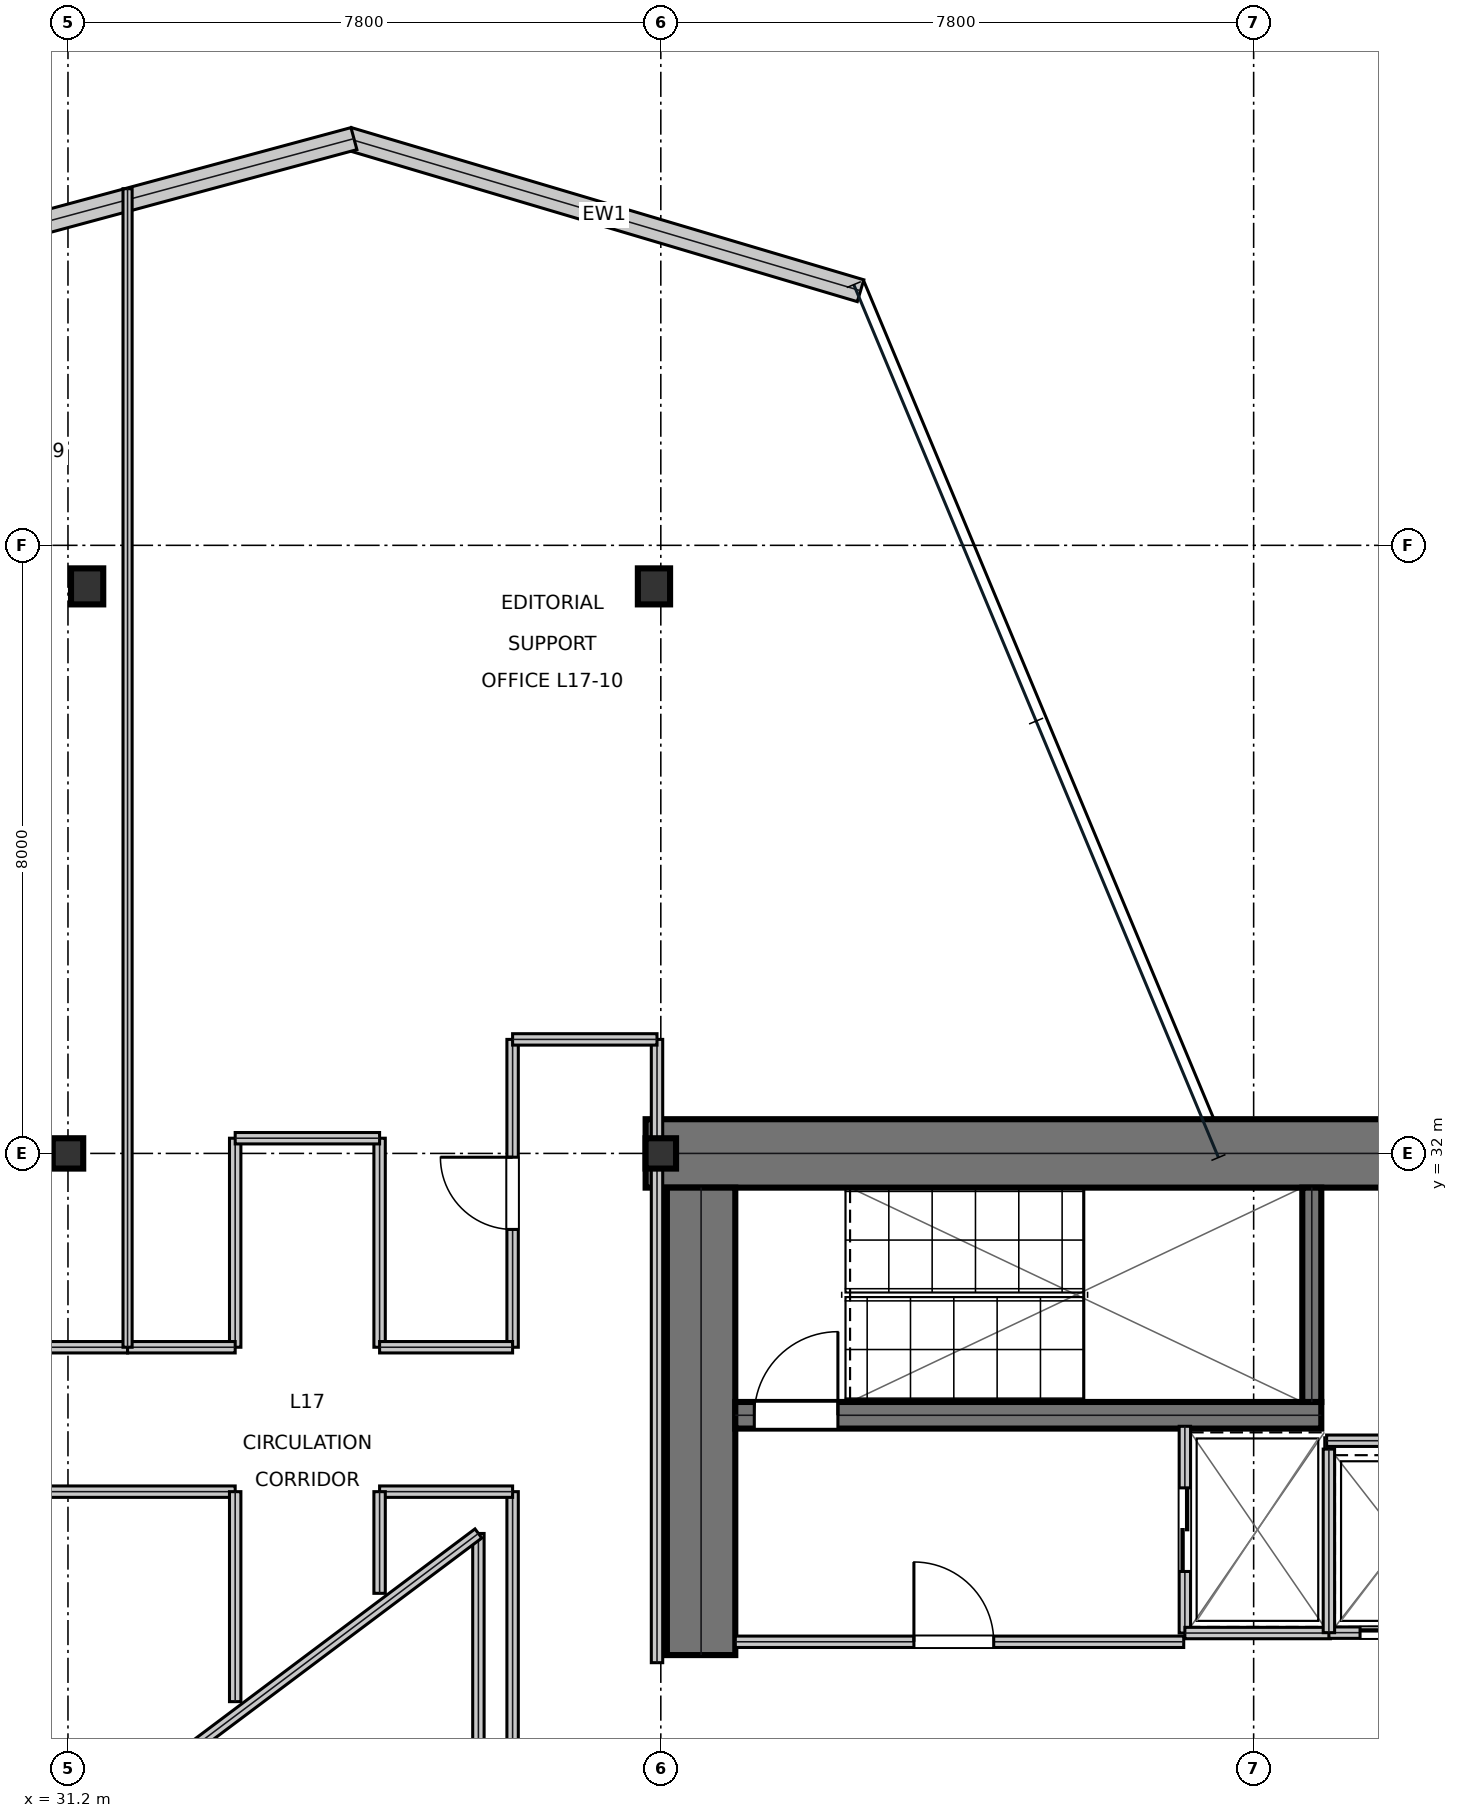
"""IFC4 building model, lengths in metres.
Left out: names, types, materials, properties, quantities, classifications, styles, units other than length and angle.
Written with IfcOpenShell. Run it as: python <this file> out.ifc"""

import sys

from ifc_helpers import new_model, si_unit, direction, frame, frame_2d, origin, origin_2d, place, context, subcontext, project, spatial, rectangle, i_section, extrude, element, fill, save


model = new_model("IFC4")
c1 = context("Model", 3, precision=1e-05, world=origin(), true_north=direction((0.0, 1.0)))
c2 = subcontext(c1, "Body", "Model", "MODEL_VIEW")
j1 = project(units=[si_unit("LENGTHUNIT", "METRE"), si_unit("PLANEANGLEUNIT", "RADIAN")], contexts=[c1])
p1 = place(None, origin())
s1 = spatial("IfcSite", under=j1, at=p1, CompositionType="ELEMENT")
p2 = place(p1, origin())
s2 = spatial("IfcBuilding", under=s1, at=p2, CompositionType="ELEMENT")
p3 = place(p2, frame((0.0, 0.0, 78.3)))
s3 = spatial("IfcBuildingStorey", under=s2, at=p3, CompositionType="ELEMENT", Elevation=78.3)
p4 = place(p3, frame((38.8, 32.0, 0.0), z_axis=(0.0, 0.0, 1.0), x_axis=(1.0, 0.0, 0.0)))
e1 = element("IfcWall", 1, at=p4, inside=s3, PredefinedType="SHEAR", context=c2, shape_type="SweptSolid", body=[
    extrude(rectangle(XDim=16.0, YDim=0.9, at=frame_2d((8.0, 0.0))), origin(), (0.0, 0.0, 1.0), 3.81),
])
p5 = place(p3, frame((39.53, 25.4, 0.0), z_axis=(0.0, 0.0, 1.0), x_axis=(0.0, 1.0, 0.0)))
e2 = element("IfcWall", 2, at=p5, inside=s3, PredefinedType="SHEAR", context=c2, shape_type="SweptSolid", body=[
    extrude(rectangle(XDim=6.15, YDim=0.9, at=frame_2d((3.075, 0.0))), origin(), (0.0, 0.0, 1.0), 3.81),
])
p6 = place(p3, frame((39.98, 28.555, 0.0), z_axis=(0.0, 0.0, 1.0), x_axis=(1.0, 0.0, 0.0)))
e3 = element("IfcWall", 3, at=p6, inside=s3, PredefinedType="SHEAR", context=c2, shape_type="SweptSolid", body=[
    extrude(rectangle(XDim=7.71, YDim=0.35, at=frame_2d((3.855, 0.0))), origin(), (0.0, 0.0, 1.0), 3.81),
])
p7 = place(p6, frame((0.25, 0.0, 0.0)))
e4 = element("IfcOpeningElement", 4, at=p7, cuts=e3, PredefinedType="OPENING", context=c2, shape_type="SweptSolid", body=[
    extrude(rectangle(XDim=1.1, YDim=2.15, at=frame_2d((0.55, 1.075))), frame((0.0, 0.185, 0.0), z_axis=(0.0, -1.0, 0.0), x_axis=(1.0, 0.0, 0.0)), (0.0, 0.0, 1.0), 0.37),
])
p8 = place(p3, frame((47.565, 28.73, 0.0), z_axis=(0.0, 0.0, 1.0), x_axis=(0.0, 1.0, 0.0)))
e5 = element("IfcWall", 5, at=p8, inside=s3, PredefinedType="SHEAR", context=c2, shape_type="SweptSolid", body=[
    extrude(rectangle(XDim=2.82, YDim=0.25, at=frame_2d((1.41, 0.0))), origin(), (0.0, 0.0, 1.0), 3.81),
])
for number, where, z_axis, x_axis in (
    (6, (31.2, 32.0, 0.0), (0.0, 0.0, 1.0), (1.0, 0.0, 0.0)),
    (7, (39.0, 32.0, 0.0), (0.0, 0.0, 1.0), (1.0, 0.0, 0.0)),
):
    element("IfcColumn", number, at=place(p3, frame(where, z_axis=z_axis, x_axis=x_axis)), inside=s3, PredefinedType="COLUMN", context=c2, shape_type="SweptSolid", body=[
        extrude(i_section(OverallWidth=0.401, OverallDepth=0.399, WebThickness=0.025, FlangeThickness=0.04, at=origin_2d()), origin(), (0.0, 0.0, 1.0), 4.044),
    ])
for number, where, z_axis, x_axis in (
    (8, (31.452, 39.46, 0.016), (0.0, 0.0, 1.0), (1.0, 0.0, 0.0)),
    (9, (38.91, 39.46, 0.016), (0.0, 0.0, 1.0), (1.0, 0.0, 0.0)),
):
    element("IfcColumn", number, at=place(p3, frame(where, z_axis=z_axis, x_axis=x_axis)), inside=s3, PredefinedType="COLUMN", context=c2, shape_type="SweptSolid", body=[
        extrude(i_section(OverallWidth=0.424, OverallDepth=0.474, WebThickness=0.048, FlangeThickness=0.077, at=origin_2d()), origin(), (0.0, 0.0, 1.0), 4.018),
    ])
p9 = place(p3, frame((41.628, 43.35, 0.0), z_axis=(0.0, 0.0, 1.0), x_axis=(-0.958632659024, 0.284646140064, 0.0)))
e10 = element("IfcWall", 10, at=p9, inside=s3, PredefinedType="STANDARD", context=c2, shape_type="SweptSolid", body=[
    extrude(rectangle(XDim=7.033, YDim=0.3, at=frame_2d((3.517, 0.0))), origin(), (0.0, 0.0, 1.0), 3.81),
])
p10 = place(p3, frame((34.962, 45.351, 0.0), z_axis=(0.0, 0.0, 1.0), x_axis=(-0.965438319853, -0.260631637679, 0.0)))
e11 = element("IfcWall", 11, at=p10, inside=s3, PredefinedType="STANDARD", context=c2, shape_type="SweptSolid", body=[
    extrude(rectangle(XDim=6.983, YDim=0.3, at=frame_2d((3.492, 0.0))), origin(), (0.0, 0.0, 1.0), 3.81),
])
p11 = place(p3, frame((39.98, 25.575, 0.0), z_axis=(0.0, 0.0, 1.0), x_axis=(1.0, 0.0, 0.0)))
e12 = element("IfcWall", 12, at=p11, inside=s3, PredefinedType="PARTITIONING", context=c2, shape_type="SweptSolid", body=[
    extrude(rectangle(XDim=5.9, YDim=0.15, at=frame_2d((2.95, 0.0))), origin(), (0.0, 0.0, 1.0), 3.81),
])
p12 = place(p11, frame((2.35, 0.0, 0.0)))
e13 = element("IfcOpeningElement", 13, at=p12, cuts=e12, PredefinedType="OPENING", context=c2, shape_type="SweptSolid", body=[
    extrude(rectangle(XDim=1.05, YDim=2.15, at=frame_2d((0.525, 1.075))), frame((0.0, 0.085, 0.0), z_axis=(0.0, -1.0, 0.0), x_axis=(1.0, 0.0, 0.0)), (0.0, 0.0, 1.0), 0.17),
])
p13 = place(p3, frame((45.895, 25.69, 0.0), z_axis=(0.0, 0.0, 1.0), x_axis=(0.0, 1.0, 0.0)))
e14 = element("IfcWall", 14, at=p13, inside=s3, PredefinedType="PARTITIONING", context=c2, shape_type="SweptSolid", body=[
    extrude(rectangle(XDim=2.72, YDim=0.15, at=frame_2d((1.36, 0.0))), origin(), (0.0, 0.0, 1.0), 3.81),
])
p14 = place(p13, frame((0.81, 0.0, 0.0)))
e15 = element("IfcOpeningElement", 15, at=p14, cuts=e14, PredefinedType="OPENING", context=c2, shape_type="SweptSolid", body=[
    extrude(rectangle(XDim=1.1, YDim=2.15, at=frame_2d((0.55, 1.075))), frame((0.0, 0.085, 0.0), z_axis=(0.0, -1.0, 0.0), x_axis=(1.0, 0.0, 0.0)), (0.0, 0.0, 1.0), 0.17),
])
p15 = place(p3, frame((45.895, 25.69, 0.0), z_axis=(0.0, 0.0, 1.0), x_axis=(1.0, 0.0, 0.0)))
e16 = element("IfcWall", 16, at=p15, inside=s3, PredefinedType="PARTITIONING", context=c2, shape_type="SweptSolid", body=[
    extrude(rectangle(XDim=1.915, YDim=0.15, at=frame_2d((0.958, 0.0))), origin(), (0.0, 0.0, 1.0), 3.81),
])
p16 = place(p3, frame((47.79, 25.695, 0.0), z_axis=(0.0, 0.0, 1.0), x_axis=(1.0, 0.0, 0.0)))
e17 = element("IfcWall", 17, at=p16, inside=s3, PredefinedType="PARTITIONING", context=c2, shape_type="SweptSolid", body=[
    extrude(rectangle(XDim=1.92, YDim=0.15, at=frame_2d((0.96, 0.0))), origin(), (0.0, 0.0, 1.0), 3.81),
])
p17 = place(p16, frame((0.41, 0.0, 0.0)))
e18 = element("IfcOpeningElement", 18, at=p17, cuts=e17, PredefinedType="OPENING", context=c2, shape_type="SweptSolid", body=[
    extrude(rectangle(XDim=1.1, YDim=2.15, at=frame_2d((0.55, 1.075))), frame((0.0, 0.085, 0.0), z_axis=(0.0, -1.0, 0.0), x_axis=(1.0, 0.0, 0.0)), (0.0, 0.0, 1.0), 0.17),
])
p18 = place(p3, frame((47.79, 25.695, 0.0), z_axis=(0.0, 0.0, 1.0), x_axis=(0.0, 1.0, 0.0)))
e19 = element("IfcWall", 19, at=p18, inside=s3, PredefinedType="PARTITIONING", context=c2, shape_type="SweptSolid", body=[
    extrude(rectangle(XDim=2.415, YDim=0.15, at=frame_2d((1.208, 0.0))), origin(), (0.0, 0.0, 1.0), 3.81),
])
p19 = place(p3, frame((47.76, 28.22, 0.0), z_axis=(0.0, 0.0, 1.0), x_axis=(1.0, 0.0, 0.0)))
e20 = element("IfcWall", 20, at=p19, inside=s3, PredefinedType="PARTITIONING", context=c2, shape_type="SweptSolid", body=[
    extrude(rectangle(XDim=1.96, YDim=0.15, at=frame_2d((0.98, 0.0))), origin(), (0.0, 0.0, 1.0), 3.81),
])
p20 = place(p3, frame((37.05, 14.5, 0.0), z_axis=(0.0, 0.0, 1.0), x_axis=(0.0, 1.0, 0.0)))
e21 = element("IfcWall", 21, at=p20, inside=s3, PredefinedType="PARTITIONING", context=c2, shape_type="SweptSolid", body=[
    extrude(rectangle(XDim=13.05, YDim=0.15, at=frame_2d((6.525, 0.0))), origin(), (0.0, 0.0, 1.0), 3.181),
])
p21 = place(p20, frame((4.61, 0.0, 0.0)))
e22 = element("IfcOpeningElement", 22, at=p21, cuts=e21, PredefinedType="OPENING", context=c2, shape_type="SweptSolid", body=[
    extrude(rectangle(XDim=0.95, YDim=2.15, at=frame_2d((0.475, 1.075))), frame((0.0, 0.085, 0.0), z_axis=(0.0, -1.0, 0.0), x_axis=(1.0, 0.0, 0.0)), (0.0, 0.0, 1.0), 0.17),
])
p22 = place(p3, frame((21.4, 27.55, 0.0), z_axis=(0.0, 0.0, 1.0), x_axis=(1.0, 0.0, 0.0)))
e23 = element("IfcWall", 23, at=p22, inside=s3, PredefinedType="PARTITIONING", context=c2, shape_type="SweptSolid", body=[
    extrude(rectangle(XDim=12.0, YDim=0.15, at=frame_2d((6.0, 0.0))), origin(), (0.0, 0.0, 1.0), 3.181),
])
p23 = place(p22, frame((5.525, 0.0, 0.0)))
e24 = element("IfcOpeningElement", 24, at=p23, cuts=e23, PredefinedType="OPENING", context=c2, shape_type="SweptSolid", body=[
    extrude(rectangle(XDim=0.95, YDim=2.15, at=frame_2d((0.475, 1.075))), frame((0.0, 0.085, 0.0), z_axis=(0.0, -1.0, 0.0), x_axis=(1.0, 0.0, 0.0)), (0.0, 0.0, 1.0), 0.17),
])
p24 = place(p3, frame((14.62, 29.45, 0.0), z_axis=(0.0, 0.0, 1.0), x_axis=(1.0, 0.0, 0.0)))
e25 = element("IfcWall", 25, at=p24, inside=s3, PredefinedType="PARTITIONING", context=c2, shape_type="SweptSolid", body=[
    extrude(rectangle(XDim=17.364, YDim=0.15, at=frame_2d((8.682, 0.0))), origin(), (0.0, 0.0, 1.0), 3.181),
])
p25 = place(p24, frame((11.987, 0.0, 0.0)))
e26 = element("IfcOpeningElement", 26, at=p25, cuts=e25, PredefinedType="OPENING", context=c2, shape_type="SweptSolid", body=[
    extrude(rectangle(XDim=0.95, YDim=2.15, at=frame_2d((0.475, 1.075))), frame((0.0, 0.085, 0.0), z_axis=(0.0, -1.0, 0.0), x_axis=(1.0, 0.0, 0.0)), (0.0, 0.0, 1.0), 0.17),
])
p26 = place(p3, frame((37.05, 29.45, 0.0), z_axis=(0.0, 0.0, 1.0), x_axis=(0.0, 1.0, 0.0)))
e27 = element("IfcWall", 27, at=p26, inside=s3, PredefinedType="PARTITIONING", context=c2, shape_type="SweptSolid", body=[
    extrude(rectangle(XDim=4.05, YDim=0.15, at=frame_2d((2.025, 0.0))), origin(), (0.0, 0.0, 1.0), 3.181),
])
p27 = place(p26, frame((1.55, 0.0, 0.0)))
e28 = element("IfcOpeningElement", 28, at=p27, cuts=e27, PredefinedType="OPENING", context=c2, shape_type="SweptSolid", body=[
    extrude(rectangle(XDim=0.95, YDim=2.15, at=frame_2d((0.475, 1.075))), frame((0.0, 0.085, 0.0), z_axis=(0.0, -1.0, 0.0), x_axis=(1.0, 0.0, 0.0)), (0.0, 0.0, 1.0), 0.17),
])
p28 = place(p3, frame((35.3, 27.55, 0.0), z_axis=(0.0, 0.0, 1.0), x_axis=(1.0, 0.0, 0.0)))
e29 = element("IfcWall", 29, at=p28, inside=s3, PredefinedType="PARTITIONING", context=c2, shape_type="SweptSolid", body=[
    extrude(rectangle(XDim=1.75, YDim=0.15, at=frame_2d((0.875, 0.0))), origin(), (0.0, 0.0, 1.0), 3.391),
])
p29 = place(p3, frame((35.3, 26.212, 0.0), z_axis=(0.0, 0.0, 1.0), x_axis=(0.0, 1.0, 0.0)))
e30 = element("IfcWall", 30, at=p29, inside=s3, PredefinedType="PARTITIONING", context=c2, shape_type="SweptSolid", body=[
    extrude(rectangle(XDim=1.338, YDim=0.15, at=frame_2d((0.669, 0.0))), origin(), (0.0, 0.0, 1.0), 3.81),
])
p30 = place(p3, frame((33.4, 24.788, 0.0), z_axis=(0.0, 0.0, 1.0), x_axis=(0.0, 1.0, 0.0)))
e31 = element("IfcWall", 31, at=p30, inside=s3, PredefinedType="PARTITIONING", context=c2, shape_type="SweptSolid", body=[
    extrude(rectangle(XDim=2.762, YDim=0.15, at=frame_2d((1.381, 0.0))), origin(), (0.0, 0.0, 1.0), 3.81),
])
p31 = place(p3, frame((38.95, 25.3, 0.0), z_axis=(0.0, 0.0, 1.0), x_axis=(0.0, 1.0, 0.0)))
e32 = element("IfcWall", 32, at=p31, inside=s3, PredefinedType="PARTITIONING", context=c2, shape_type="SweptSolid", body=[
    extrude(rectangle(XDim=8.2, YDim=0.15, at=frame_2d((4.1, 0.0))), origin(), (0.0, 0.0, 1.0), 3.181),
])
for number, where, z_axis, x_axis in (
    (33, (33.4, 29.45, 0.0), (0.0, 0.0, 1.0), (0.0, 1.0, 0.0)),
    (34, (35.3, 29.45, 0.0), (0.0, 0.0, 1.0), (0.0, 1.0, 0.0)),
):
    element("IfcWall", number, at=place(p3, frame(where, z_axis=z_axis, x_axis=x_axis)), inside=s3, PredefinedType="PARTITIONING", context=c2, shape_type="SweptSolid", body=[
        extrude(rectangle(XDim=2.75, YDim=0.15, at=frame_2d((1.375, 0.0))), origin(), (0.0, 0.0, 1.0), 3.181),
    ])
p32 = place(p3, frame((37.05, 33.5, 0.0), z_axis=(0.0, 0.0, 1.0), x_axis=(1.0, 0.0, 0.0)))
e35 = element("IfcWall", 35, at=p32, inside=s3, PredefinedType="PARTITIONING", context=c2, shape_type="SweptSolid", body=[
    extrude(rectangle(XDim=1.9, YDim=0.15, at=frame_2d((0.95, 0.0))), origin(), (0.0, 0.0, 1.0), 3.81),
])
p33 = place(p3, frame((33.4, 32.2, 0.0), z_axis=(0.0, 0.0, 1.0), x_axis=(1.0, 0.0, 0.0)))
e36 = element("IfcWall", 36, at=p33, inside=s3, PredefinedType="PARTITIONING", context=c2, shape_type="SweptSolid", body=[
    extrude(rectangle(XDim=1.9, YDim=0.15, at=frame_2d((0.95, 0.0))), origin(), (0.0, 0.0, 1.0), 3.181),
])
p34 = place(p3, frame((35.3, 29.45, 0.0), z_axis=(0.0, 0.0, 1.0), x_axis=(1.0, 0.0, 0.0)))
e37 = element("IfcWall", 37, at=p34, inside=s3, PredefinedType="PARTITIONING", context=c2, shape_type="SweptSolid", body=[
    extrude(rectangle(XDim=1.75, YDim=0.15, at=frame_2d((0.875, 0.0))), origin(), (0.0, 0.0, 1.0), 3.81),
])
p35 = place(p3, frame((31.984, 29.45, 0.0), z_axis=(0.0, 0.0, 1.0), x_axis=(1.0, 0.0, 0.0)))
e38 = element("IfcWall", 38, at=p35, inside=s3, PredefinedType="PARTITIONING", context=c2, shape_type="SweptSolid", body=[
    extrude(rectangle(XDim=1.416, YDim=0.15, at=frame_2d((0.708, 0.0))), origin(), (0.0, 0.0, 1.0), 3.81),
])
p36 = place(p3, frame((31.984, 29.45, 0.0), z_axis=(0.0, 0.0, 1.0), x_axis=(0.0, 1.0, 0.0)))
e39 = element("IfcWall", 39, at=p36, inside=s3, PredefinedType="PARTITIONING", context=c2, shape_type="SweptSolid", body=[
    extrude(rectangle(XDim=15.242, YDim=0.12, at=frame_2d((7.621, 0.0))), origin(), (0.0, 0.0, 1.0), 3.181),
])
p37 = place(p3, frame((36.6, 21.0, 0.0), z_axis=(0.0, 0.0, 1.0), x_axis=(0.0, 1.0, 0.0)))
e40 = element("IfcWall", 40, at=p37, inside=s3, PredefinedType="MOVABLE", context=c2, shape_type="SweptSolid", body=[
    extrude(rectangle(XDim=6.0, YDim=0.15, at=frame_2d((3.0, 0.0))), origin(), (0.0, 0.0, 1.0), 3.81),
])
p38 = place(p3, frame((36.6, 27.0, 0.0), z_axis=(0.0, 0.0, 1.0), x_axis=(-0.8, -0.6, 0.0)))
e41 = element("IfcWall", 41, at=p38, inside=s3, PredefinedType="MOVABLE", context=c2, shape_type="SweptSolid", body=[
    extrude(rectangle(XDim=5.0, YDim=0.15, at=frame_2d((2.5, 0.0))), origin(), (0.0, 0.0, 1.0), 3.81),
])
p39 = place(p12, origin())
e42 = element("IfcDoor", 42, at=p39, inside=s3, OperationType="SINGLE_SWING_LEFT", PredefinedType="DOOR", context=c2, shape_type="SweptSolid", body=[
    extrude(rectangle(XDim=1.05, YDim=2.15, at=frame_2d((0.525, 1.075))), frame((0.0, 0.025, 0.0), z_axis=(0.0, -1.0, 0.0), x_axis=(1.0, 0.0, 0.0)), (0.0, 0.0, 1.0), 0.05),
])
fill(e13, e42)
p40 = place(p14, frame((1.1, 0.0, 0.0), z_axis=(0.0, 0.0, 1.0), x_axis=(-1.0, 0.0, 0.0)))
e43 = element("IfcDoor", 43, at=p40, inside=s3, OperationType="DOUBLE_DOOR_SLIDING", PredefinedType="DOOR", context=c2, shape_type="SweptSolid", body=[
    extrude(rectangle(XDim=1.1, YDim=2.15, at=frame_2d((0.55, 1.075))), frame((0.0, 0.025, 0.0), z_axis=(0.0, -1.0, 0.0), x_axis=(1.0, 0.0, 0.0)), (0.0, 0.0, 1.0), 0.05),
])
fill(e15, e43)
p41 = place(p17, frame((1.1, 0.0, 0.0), z_axis=(0.0, 0.0, 1.0), x_axis=(-1.0, 0.0, 0.0)))
e44 = element("IfcDoor", 44, at=p41, inside=s3, OperationType="DOUBLE_DOOR_SLIDING", PredefinedType="DOOR", context=c2, shape_type="SweptSolid", body=[
    extrude(rectangle(XDim=1.1, YDim=2.15, at=frame_2d((0.55, 1.075))), frame((0.0, 0.025, 0.0), z_axis=(0.0, -1.0, 0.0), x_axis=(1.0, 0.0, 0.0)), (0.0, 0.0, 1.0), 0.05),
])
fill(e18, e44)
p42 = place(p27, origin())
e45 = element("IfcDoor", 45, at=p42, inside=s3, OperationType="SINGLE_SWING_RIGHT", PredefinedType="DOOR", context=c2, shape_type="SweptSolid", body=[
    extrude(rectangle(XDim=0.95, YDim=2.15, at=frame_2d((0.475, 1.075))), frame((0.0, 0.025, 0.0), z_axis=(0.0, -1.0, 0.0), x_axis=(1.0, 0.0, 0.0)), (0.0, 0.0, 1.0), 0.05),
])
fill(e28, e45)
p43 = place(p7, origin())
e46 = element("IfcDoor", 46, at=p43, inside=s3, OperationType="SINGLE_SWING_RIGHT", PredefinedType="DOOR", context=c2, shape_type="SweptSolid", body=[
    extrude(rectangle(XDim=1.1, YDim=2.15, at=frame_2d((0.55, 1.075))), frame((0.0, 0.025, 0.0), z_axis=(0.0, -1.0, 0.0), x_axis=(1.0, 0.0, 0.0)), (0.0, 0.0, 1.0), 0.05),
])
fill(e4, e46)
save(model, sys.argv[1])
